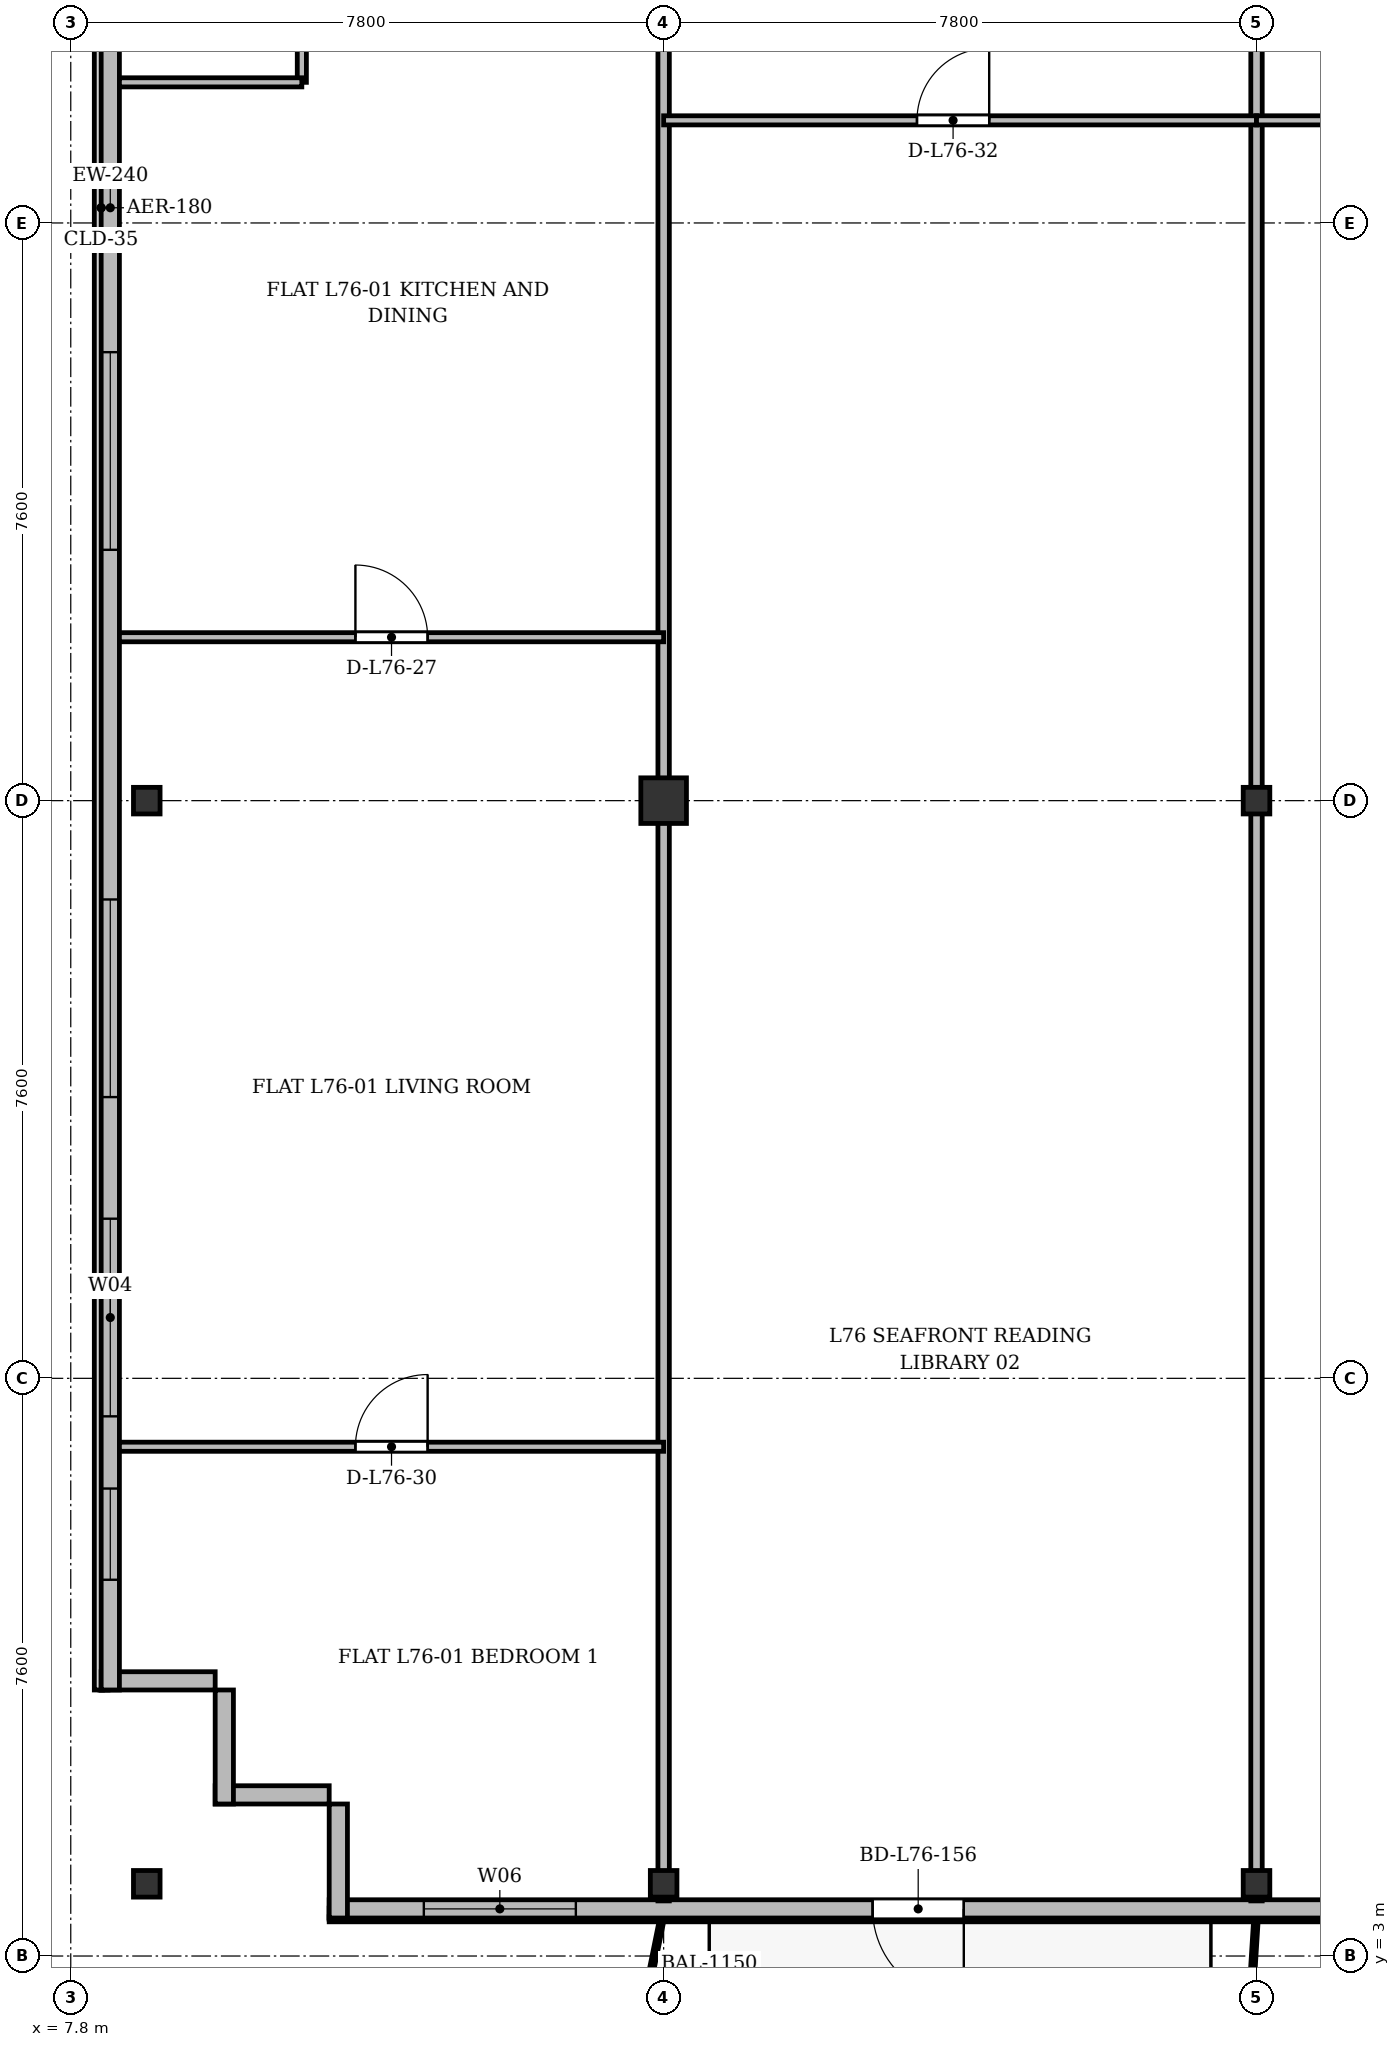
"""IFC4 building model, lengths in metres.
Left out: names, types, materials, properties, quantities, classifications, styles, units other than length and angle.
Written with IfcOpenShell. Run it as: python <this file> out.ifc"""

import sys

from ifc_helpers import new_model, si_unit, direction, frame, frame_2d, origin, origin_2d, place, context, subcontext, project, spatial, rectangle, i_section, extrude, source, transform, mapped, element, fill, save


model = new_model("IFC4")
c1 = context("Model", 3, precision=1e-05, world=origin(), true_north=direction((0.0, 1.0)))
c2 = subcontext(c1, "Body", "Model", "MODEL_VIEW")
j1 = project(units=[si_unit("LENGTHUNIT", "METRE"), si_unit("PLANEANGLEUNIT", "RADIAN")], contexts=[c1])
p1 = place(None, origin())
s1 = spatial("IfcSite", under=j1, at=p1, CompositionType="ELEMENT")
p2 = place(p1, origin())
s2 = spatial("IfcBuilding", under=s1, at=p2, CompositionType="ELEMENT")
p3 = place(p2, frame((0.0, 0.0, 291.9)))
s3 = spatial("IfcBuildingStorey", under=s2, at=p3, CompositionType="ELEMENT", Elevation=291.9)
m1 = source(origin(), c2, "Body", "SweptSolid", [
    extrude(i_section(OverallWidth=0.35, OverallDepth=0.35, WebThickness=0.018, FlangeThickness=0.028, at=origin_2d()), origin(), (0.0, 0.0, 1.0), 3.6),
])
for number, where, z_axis, x_axis in (
    (1, (8.8, 3.95, 0.0), (0.0, 0.0, 1.0), (1.0, 0.0, 0.0)),
    (2, (8.8, 18.2, 0.0), (0.0, 0.0, 1.0), (1.0, 0.0, 0.0)),
    (3, (15.6, 3.95, 0.0), (0.0, 0.0, 1.0), (1.0, 0.0, 0.0)),
):
    element("IfcColumn", number, at=place(p3, frame(where, z_axis=z_axis, x_axis=x_axis)), inside=s3, PredefinedType="COLUMN", context=c2, shape_type="MappedRepresentation", body=[
        mapped(m1, transform((0.0, 0.0, 0.0), x_axis=(1.0, 0.0, 0.0), y_axis=(0.0, 1.0, 0.0), z_axis=(0.0, 0.0, 1.0), scale=1.0)),
    ])
m2 = source(origin(), c2, "Body", "SweptSolid", [
    extrude(rectangle(XDim=0.6, YDim=0.6, at=origin_2d()), origin(), (0.0, 0.0, 1.0), 3.6),
])
p4 = place(p3, frame((15.6, 18.2, 0.0), z_axis=(0.0, 0.0, 1.0), x_axis=(1.0, 0.0, 0.0)))
e4 = element("IfcColumn", 4, at=p4, inside=s3, PredefinedType="COLUMN", context=c2, shape_type="MappedRepresentation", body=[
    mapped(m2, transform((0.0, 0.0, 0.0), x_axis=(1.0, 0.0, 0.0), y_axis=(0.0, 1.0, 0.0), z_axis=(0.0, 0.0, 1.0), scale=1.0)),
])
for number, where, z_axis, x_axis in (
    (5, (23.4, 3.95, 0.0), (0.0, 0.0, 1.0), (1.0, 0.0, 0.0)),
    (6, (23.4, 18.2, 0.0), (0.0, 0.0, 1.0), (1.0, 0.0, 0.0)),
):
    element("IfcColumn", number, at=place(p3, frame(where, z_axis=z_axis, x_axis=x_axis)), inside=s3, PredefinedType="COLUMN", context=c2, shape_type="MappedRepresentation", body=[
        mapped(m1, transform((0.0, 0.0, 0.0), x_axis=(1.0, 0.0, 0.0), y_axis=(0.0, 1.0, 0.0), z_axis=(0.0, 0.0, 1.0), scale=1.0)),
    ])
for number, where, z_axis, x_axis in (
    (7, (11.2, 5.12, 0.0), (0.0, 0.0, 1.0), (-1.0, 0.0, 0.0)),
    (8, (9.82, 5.0, 0.0), (0.0, 0.0, 1.0), (0.0, 1.0, 0.0)),
):
    element("IfcWall", number, at=place(p3, frame(where, z_axis=z_axis, x_axis=x_axis)), inside=s3, PredefinedType="SOLIDWALL", context=c2, shape_type="SweptSolid", body=[
        extrude(rectangle(XDim=1.5, YDim=0.24, at=frame_2d((0.75, 0.0))), origin(), (0.0, 0.0, 1.0), 3.18),
    ])
p5 = place(p3, frame((9.7, 6.62, 0.0), z_axis=(0.0, 0.0, 1.0), x_axis=(-1.0, 0.0, 0.0)))
e9 = element("IfcWall", 9, at=p5, inside=s3, PredefinedType="SOLIDWALL", context=c2, shape_type="SweptSolid", body=[
    extrude(rectangle(XDim=1.5, YDim=0.24, at=frame_2d((0.75, 0.0))), origin(), (0.0, 0.0, 1.0), 2.68),
])
p6 = place(p3, frame((8.32, 6.5, 0.0), z_axis=(0.0, 0.0, 1.0), x_axis=(0.0, 1.0, 0.0)))
e10 = element("IfcWall", 10, at=p6, inside=s3, PredefinedType="SOLIDWALL", context=c2, shape_type="SweptSolid", body=[
    extrude(rectangle(XDim=39.0, YDim=0.24, at=frame_2d((19.5, 0.0))), origin(), (0.0, 0.0, 1.0), 3.18),
])
p7 = place(p6, frame((1.45, 0.0, 0.92)))
e11 = element("IfcOpeningElement", 11, at=p7, cuts=e10, PredefinedType="OPENING", context=c2, shape_type="SweptSolid", body=[
    extrude(rectangle(XDim=1.2, YDim=1.65, at=frame_2d((0.6, 0.825))), frame((0.0, 0.13, 0.0), z_axis=(0.0, -1.0, 0.0), x_axis=(1.0, 0.0, 0.0)), (0.0, 0.0, 1.0), 0.26),
])
p8 = place(p6, frame((3.6, 0.0, 0.92)))
e12 = element("IfcOpeningElement", 12, at=p8, cuts=e10, PredefinedType="OPENING", context=c2, shape_type="SweptSolid", body=[
    extrude(rectangle(XDim=2.6, YDim=1.9, at=frame_2d((1.3, 0.95))), frame((0.0, 0.13, 0.0), z_axis=(0.0, -1.0, 0.0), x_axis=(1.0, 0.0, 0.0)), (0.0, 0.0, 1.0), 0.26),
])
p9 = place(p6, frame((7.8, 0.0, 0.92)))
e13 = element("IfcOpeningElement", 13, at=p9, cuts=e10, PredefinedType="OPENING", context=c2, shape_type="SweptSolid", body=[
    extrude(rectangle(XDim=2.6, YDim=1.9, at=frame_2d((1.3, 0.95))), frame((0.0, 0.13, 0.0), z_axis=(0.0, -1.0, 0.0), x_axis=(1.0, 0.0, 0.0)), (0.0, 0.0, 1.0), 0.26),
])
p10 = place(p6, frame((15.0, 0.0, 0.92)))
e14 = element("IfcOpeningElement", 14, at=p10, cuts=e10, PredefinedType="OPENING", context=c2, shape_type="SweptSolid", body=[
    extrude(rectangle(XDim=2.6, YDim=1.9, at=frame_2d((1.3, 0.95))), frame((0.0, 0.13, 0.0), z_axis=(0.0, -1.0, 0.0), x_axis=(1.0, 0.0, 0.0)), (0.0, 0.0, 1.0), 0.26),
])
p11 = place(p6, frame((29.0, 0.0, 0.92)))
e15 = element("IfcOpeningElement", 15, at=p11, cuts=e10, PredefinedType="OPENING", context=c2, shape_type="SweptSolid", body=[
    extrude(rectangle(XDim=2.6, YDim=1.9, at=frame_2d((1.3, 0.95))), frame((0.0, 0.13, 0.0), z_axis=(0.0, -1.0, 0.0), x_axis=(1.0, 0.0, 0.0)), (0.0, 0.0, 1.0), 0.26),
])
p12 = place(p6, frame((33.3, 0.0, 0.92)))
e16 = element("IfcOpeningElement", 16, at=p12, cuts=e10, PredefinedType="OPENING", context=c2, shape_type="SweptSolid", body=[
    extrude(rectangle(XDim=1.2, YDim=1.65, at=frame_2d((0.6, 0.825))), frame((0.0, 0.13, 0.0), z_axis=(0.0, -1.0, 0.0), x_axis=(1.0, 0.0, 0.0)), (0.0, 0.0, 1.0), 0.26),
])
p13 = place(p6, frame((36.65, 0.0, 0.92)))
e17 = element("IfcOpeningElement", 17, at=p13, cuts=e10, PredefinedType="OPENING", context=c2, shape_type="SweptSolid", body=[
    extrude(rectangle(XDim=1.2, YDim=1.65, at=frame_2d((0.6, 0.825))), frame((0.0, 0.13, 0.0), z_axis=(0.0, -1.0, 0.0), x_axis=(1.0, 0.0, 0.0)), (0.0, 0.0, 1.0), 0.26),
])
p14 = place(p3, frame((31.4, 3.62, 0.0), z_axis=(0.0, 0.0, 1.0), x_axis=(-1.0, 0.0, 0.0)))
e18 = element("IfcWall", 18, at=p14, inside=s3, PredefinedType="SOLIDWALL", context=c2, shape_type="SweptSolid", body=[
    extrude(rectangle(XDim=20.2, YDim=0.24, at=frame_2d((10.1, 0.0))), origin(), (0.0, 0.0, 1.0), 3.18),
])
p15 = place(p14, frame((2.945, 0.0, 0.9)))
e19 = element("IfcOpeningElement", 19, at=p15, cuts=e18, PredefinedType="OPENING", context=c2, shape_type="SweptSolid", body=[
    extrude(rectangle(XDim=2.2, YDim=1.8, at=frame_2d((1.1, 0.9))), frame((0.0, 0.13, 0.0), z_axis=(0.0, -1.0, 0.0), x_axis=(1.0, 0.0, 0.0)), (0.0, 0.0, 1.0), 0.26),
])
p16 = place(p14, frame((11.851, 0.0, 0.0)))
e20 = element("IfcOpeningElement", 20, at=p16, cuts=e18, PredefinedType="OPENING", context=c2, shape_type="SweptSolid", body=[
    extrude(rectangle(XDim=1.2, YDim=2.2, at=frame_2d((0.6, 1.1))), frame((0.0, 0.13, 0.0), z_axis=(0.0, -1.0, 0.0), x_axis=(1.0, 0.0, 0.0)), (0.0, 0.0, 1.0), 0.26),
])
p17 = place(p14, frame((16.955, 0.0, 0.9)))
e21 = element("IfcOpeningElement", 21, at=p17, cuts=e18, PredefinedType="OPENING", context=c2, shape_type="SweptSolid", body=[
    extrude(rectangle(XDim=2.0, YDim=1.95, at=frame_2d((1.0, 0.975))), frame((0.0, 0.13, 0.0), z_axis=(0.0, -1.0, 0.0), x_axis=(1.0, 0.0, 0.0)), (0.0, 0.0, 1.0), 0.26),
])
p18 = place(p3, frame((11.32, 3.5, 0.0), z_axis=(0.0, 0.0, 1.0), x_axis=(0.0, 1.0, 0.0)))
e22 = element("IfcWall", 22, at=p18, inside=s3, PredefinedType="SOLIDWALL", context=c2, shape_type="SweptSolid", body=[
    extrude(rectangle(XDim=1.5, YDim=0.24, at=frame_2d((0.75, 0.0))), origin(), (0.0, 0.0, 1.0), 2.73),
])
p19 = place(p3, frame((15.6, 3.725, 0.0), z_axis=(0.0, 0.0, 1.0), x_axis=(0.0, 1.0, 0.0)))
e23 = element("IfcWall", 23, at=p19, inside=s3, PredefinedType="PARTITIONING", context=c2, shape_type="SweptSolid", body=[
    extrude(rectangle(XDim=27.275, YDim=0.15, at=frame_2d((13.637, 0.0))), origin(), (0.0, 0.0, 1.0), 2.53),
])
p20 = place(p3, frame((23.4, 3.725, 0.0), z_axis=(0.0, 0.0, 1.0), x_axis=(0.0, 1.0, 0.0)))
e24 = element("IfcWall", 24, at=p20, inside=s3, PredefinedType="PARTITIONING", context=c2, shape_type="SweptSolid", body=[
    extrude(rectangle(XDim=27.275, YDim=0.15, at=frame_2d((13.637, 0.0))), origin(), (0.0, 0.0, 1.0), 2.68),
])
p21 = place(p3, frame((8.44, 20.35, 0.0), z_axis=(0.0, 0.0, 1.0), x_axis=(1.0, 0.0, 0.0)))
e25 = element("IfcWall", 25, at=p21, inside=s3, PredefinedType="PARTITIONING", context=c2, shape_type="SweptSolid", body=[
    extrude(rectangle(XDim=7.16, YDim=0.12, at=frame_2d((3.58, 0.0))), origin(), (0.0, 0.0, 1.0), 2.68),
])
p22 = place(p21, frame((3.105, 0.0, 0.0)))
e26 = element("IfcOpeningElement", 26, at=p22, cuts=e25, PredefinedType="OPENING", context=c2, shape_type="SweptSolid", body=[
    extrude(rectangle(XDim=0.95, YDim=2.15, at=frame_2d((0.475, 1.075))), frame((0.0, 0.07, 0.0), z_axis=(0.0, -1.0, 0.0), x_axis=(1.0, 0.0, 0.0)), (0.0, 0.0, 1.0), 0.14),
])
p23 = place(p3, frame((10.84, 27.65, 0.0), z_axis=(0.0, 0.0, 1.0), x_axis=(0.0, 1.0, 0.0)))
e27 = element("IfcWall", 27, at=p23, inside=s3, PredefinedType="PARTITIONING", context=c2, shape_type="SweptSolid", body=[
    extrude(rectangle(XDim=3.35, YDim=0.12, at=frame_2d((1.675, 0.0))), origin(), (0.0, 0.0, 1.0), 3.18),
])
p24 = place(p23, frame((0.8, 0.0, 0.0)))
e28 = element("IfcOpeningElement", 28, at=p24, cuts=e27, PredefinedType="OPENING", context=c2, shape_type="SweptSolid", body=[
    extrude(rectangle(XDim=0.85, YDim=2.1, at=frame_2d((0.425, 1.05))), frame((0.0, 0.07, 0.0), z_axis=(0.0, -1.0, 0.0), x_axis=(1.0, 0.0, 0.0)), (0.0, 0.0, 1.0), 0.14),
])
p25 = place(p3, frame((8.44, 27.65, 0.0), z_axis=(0.0, 0.0, 1.0), x_axis=(1.0, 0.0, 0.0)))
e29 = element("IfcWall", 29, at=p25, inside=s3, PredefinedType="PARTITIONING", context=c2, shape_type="SweptSolid", body=[
    extrude(rectangle(XDim=2.4, YDim=0.12, at=frame_2d((1.2, 0.0))), origin(), (0.0, 0.0, 1.0), 2.68),
])
p26 = place(p3, frame((8.44, 9.7, 0.0), z_axis=(0.0, 0.0, 1.0), x_axis=(1.0, 0.0, 0.0)))
e30 = element("IfcWall", 30, at=p26, inside=s3, PredefinedType="PARTITIONING", context=c2, shape_type="SweptSolid", body=[
    extrude(rectangle(XDim=7.16, YDim=0.12, at=frame_2d((3.58, 0.0))), origin(), (0.0, 0.0, 1.0), 2.68),
])
p27 = place(p26, frame((3.105, 0.0, 0.0)))
e31 = element("IfcOpeningElement", 31, at=p27, cuts=e30, PredefinedType="OPENING", context=c2, shape_type="SweptSolid", body=[
    extrude(rectangle(XDim=0.95, YDim=2.15, at=frame_2d((0.475, 1.075))), frame((0.0, 0.07, 0.0), z_axis=(0.0, -1.0, 0.0), x_axis=(1.0, 0.0, 0.0)), (0.0, 0.0, 1.0), 0.14),
])
p28 = place(p3, frame((15.6, 27.15, 0.0), z_axis=(0.0, 0.0, 1.0), x_axis=(1.0, 0.0, 0.0)))
e32 = element("IfcWall", 32, at=p28, inside=s3, PredefinedType="PARTITIONING", context=c2, shape_type="SweptSolid", body=[
    extrude(rectangle(XDim=7.8, YDim=0.12, at=frame_2d((3.9, 0.0))), origin(), (0.0, 0.0, 1.0), 2.68),
])
p29 = place(p28, frame((3.333, 0.0, 0.0)))
e33 = element("IfcOpeningElement", 33, at=p29, cuts=e32, PredefinedType="OPENING", context=c2, shape_type="SweptSolid", body=[
    extrude(rectangle(XDim=0.95, YDim=2.15, at=frame_2d((0.475, 1.075))), frame((0.0, 0.07, 0.0), z_axis=(0.0, -1.0, 0.0), x_axis=(1.0, 0.0, 0.0)), (0.0, 0.0, 1.0), 0.14),
])
p30 = place(p3, frame((23.4, 27.15, 0.0), z_axis=(0.0, 0.0, 1.0), x_axis=(1.0, 0.0, 0.0)))
e34 = element("IfcWall", 34, at=p30, inside=s3, PredefinedType="PARTITIONING", context=c2, shape_type="SweptSolid", body=[
    extrude(rectangle(XDim=9.8, YDim=0.12, at=frame_2d((4.9, 0.0))), origin(), (0.0, 0.0, 1.0), 2.68),
])
p31 = place(p30, frame((4.425, 0.0, 0.0)))
e35 = element("IfcOpeningElement", 35, at=p31, cuts=e34, PredefinedType="OPENING", context=c2, shape_type="SweptSolid", body=[
    extrude(rectangle(XDim=0.95, YDim=2.15, at=frame_2d((0.475, 1.075))), frame((0.0, 0.07, 0.0), z_axis=(0.0, -1.0, 0.0), x_axis=(1.0, 0.0, 0.0)), (0.0, 0.0, 1.0), 0.14),
])
m3 = source(origin(), c2, "Body", "SweptSolid", [
    extrude(rectangle(XDim=1.2, YDim=1.65, at=frame_2d((0.6, 0.825))), frame((0.0, 0.03, 0.0), z_axis=(0.0, -1.0, 0.0), x_axis=(1.0, 0.0, 0.0)), (0.0, 0.0, 1.0), 0.06),
])
p32 = place(p7, origin())
e36 = element("IfcWindow", 36, at=p32, inside=s3, PartitioningType="SINGLE_PANEL", PredefinedType="WINDOW", context=c2, shape_type="MappedRepresentation", body=[
    mapped(m3, transform((0.0, 0.0, 0.0), x_axis=(1.0, 0.0, 0.0), y_axis=(0.0, 1.0, 0.0), z_axis=(0.0, 0.0, 1.0), scale=1.0)),
])
fill(e11, e36)
m4 = source(origin(), c2, "Body", "SweptSolid", [
    extrude(rectangle(XDim=2.6, YDim=1.9, at=frame_2d((1.3, 0.95))), frame((0.0, 0.03, 0.0), z_axis=(0.0, -1.0, 0.0), x_axis=(1.0, 0.0, 0.0)), (0.0, 0.0, 1.0), 0.06),
])
p33 = place(p8, origin())
e37 = element("IfcWindow", 37, at=p33, inside=s3, PartitioningType="SINGLE_PANEL", PredefinedType="WINDOW", context=c2, shape_type="MappedRepresentation", body=[
    mapped(m4, transform((0.0, 0.0, 0.0), x_axis=(1.0, 0.0, 0.0), y_axis=(0.0, 1.0, 0.0), z_axis=(0.0, 0.0, 1.0), scale=1.0)),
])
fill(e12, e37)
p34 = place(p9, origin())
e38 = element("IfcWindow", 38, at=p34, inside=s3, PartitioningType="SINGLE_PANEL", PredefinedType="WINDOW", context=c2, shape_type="MappedRepresentation", body=[
    mapped(m4, transform((0.0, 0.0, 0.0), x_axis=(1.0, 0.0, 0.0), y_axis=(0.0, 1.0, 0.0), z_axis=(0.0, 0.0, 1.0), scale=1.0)),
])
fill(e13, e38)
p35 = place(p10, origin())
e39 = element("IfcWindow", 39, at=p35, inside=s3, PartitioningType="SINGLE_PANEL", PredefinedType="WINDOW", context=c2, shape_type="MappedRepresentation", body=[
    mapped(m4, transform((0.0, 0.0, 0.0), x_axis=(1.0, 0.0, 0.0), y_axis=(0.0, 1.0, 0.0), z_axis=(0.0, 0.0, 1.0), scale=1.0)),
])
fill(e14, e39)
m5 = source(origin(), c2, "Body", "SweptSolid", [
    extrude(rectangle(XDim=1.2, YDim=2.2, at=frame_2d((0.6, 1.1))), frame((0.0, 0.025, 0.0), z_axis=(0.0, -1.0, 0.0), x_axis=(1.0, 0.0, 0.0)), (0.0, 0.0, 1.0), 0.05),
])
p36 = place(p16, origin())
e40 = element("IfcDoor", 40, at=p36, inside=s3, OperationType="SINGLE_SWING_LEFT", PredefinedType="DOOR", context=c2, shape_type="MappedRepresentation", body=[
    mapped(m5, transform((0.0, 0.0, 0.0), x_axis=(1.0, 0.0, 0.0), y_axis=(0.0, 1.0, 0.0), z_axis=(0.0, 0.0, 1.0), scale=1.0)),
])
fill(e20, e40)
m6 = source(origin(), c2, "Body", "SweptSolid", [
    extrude(rectangle(XDim=2.0, YDim=1.95, at=frame_2d((1.0, 0.975))), frame((0.0, 0.03, 0.0), z_axis=(0.0, -1.0, 0.0), x_axis=(1.0, 0.0, 0.0)), (0.0, 0.0, 1.0), 0.06),
])
p37 = place(p17, origin())
e41 = element("IfcWindow", 41, at=p37, inside=s3, PartitioningType="SINGLE_PANEL", PredefinedType="WINDOW", context=c2, shape_type="MappedRepresentation", body=[
    mapped(m6, transform((0.0, 0.0, 0.0), x_axis=(1.0, 0.0, 0.0), y_axis=(0.0, 1.0, 0.0), z_axis=(0.0, 0.0, 1.0), scale=1.0)),
])
fill(e21, e41)
m7 = source(origin(), c2, "Body", "SweptSolid", [
    extrude(rectangle(XDim=0.95, YDim=2.15, at=frame_2d((0.475, 1.075))), frame((0.0, 0.025, 0.0), z_axis=(0.0, -1.0, 0.0), x_axis=(1.0, 0.0, 0.0)), (0.0, 0.0, 1.0), 0.05),
])
p38 = place(p22, origin())
e42 = element("IfcDoor", 42, at=p38, inside=s3, OperationType="SINGLE_SWING_LEFT", PredefinedType="DOOR", context=c2, shape_type="MappedRepresentation", body=[
    mapped(m7, transform((0.0, 0.0, 0.0), x_axis=(1.0, 0.0, 0.0), y_axis=(0.0, 1.0, 0.0), z_axis=(0.0, 0.0, 1.0), scale=1.0)),
])
fill(e26, e42)
p39 = place(p27, origin())
e43 = element("IfcDoor", 43, at=p39, inside=s3, OperationType="SINGLE_SWING_RIGHT", PredefinedType="DOOR", context=c2, shape_type="MappedRepresentation", body=[
    mapped(m7, transform((0.0, 0.0, 0.0), x_axis=(1.0, 0.0, 0.0), y_axis=(0.0, 1.0, 0.0), z_axis=(0.0, 0.0, 1.0), scale=1.0)),
])
fill(e31, e43)
p40 = place(p29, origin())
e44 = element("IfcDoor", 44, at=p40, inside=s3, OperationType="SINGLE_SWING_RIGHT", PredefinedType="DOOR", context=c2, shape_type="MappedRepresentation", body=[
    mapped(m7, transform((0.0, 0.0, 0.0), x_axis=(1.0, 0.0, 0.0), y_axis=(0.0, 1.0, 0.0), z_axis=(0.0, 0.0, 1.0), scale=1.0)),
])
fill(e33, e44)
save(model, sys.argv[1])
